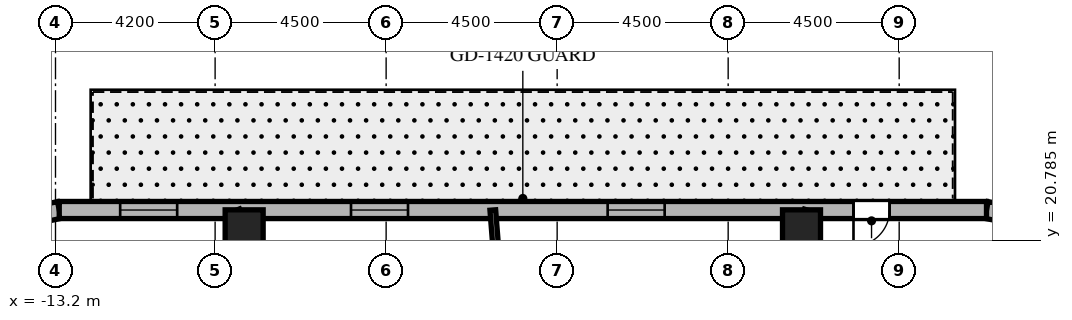
"""IFC4 building model, lengths in metres.
Left out: names, types, materials, properties, quantities, classifications, styles, units other than length and angle.
Written with IfcOpenShell. Run it as: python <this file> out.ifc"""

import sys

from ifc_helpers import new_model, si_unit, direction, frame, frame_2d, origin, origin_2d, place, context, subcontext, project, spatial, rectangle, extrude, element, fill, save


model = new_model("IFC4")
c1 = context("Model", 3, precision=1e-05, world=origin(), true_north=direction((0.0, 1.0)))
c2 = subcontext(c1, "Body", "Model", "MODEL_VIEW")
j1 = project(units=[si_unit("LENGTHUNIT", "METRE"), si_unit("PLANEANGLEUNIT", "RADIAN")], contexts=[c1])
p1 = place(None, origin())
s1 = spatial("IfcSite", under=j1, at=p1, CompositionType="ELEMENT")
p2 = place(p1, origin())
s2 = spatial("IfcBuilding", under=s1, at=p2, CompositionType="ELEMENT")
p3 = place(p2, frame((0.0, 0.0, 252.1)))
s3 = spatial("IfcBuildingStorey", under=s2, at=p3, CompositionType="ELEMENT", Elevation=252.1)
for number, where, z_axis, x_axis in (
    (1, (6.43, 21.08, 0.0), (0.0, 0.0, 1.0), (1.0, 0.0, 0.0)),
    (2, (-8.236, 21.08, 0.0), (0.0, 0.0, 1.0), (1.0, 0.0, 0.0)),
):
    element("IfcColumn", number, at=place(p3, frame(where, z_axis=z_axis, x_axis=x_axis)), inside=s3, PredefinedType="COLUMN", context=c2, shape_type="SweptSolid", body=[
        extrude(rectangle(XDim=1.0, YDim=1.0, at=origin_2d()), origin(), (0.0, 0.0, 1.0), 3.8),
    ])
p4 = place(p3, frame((12.546, 21.34, 0.0), z_axis=(0.0, 0.0, 1.0), x_axis=(-0.982686750835, 0.18527479519, 0.0)))
e3 = element("IfcWall", 3, at=p4, inside=s3, PredefinedType="SOLIDWALL", context=c2, shape_type="SweptSolid", body=[
    extrude(rectangle(XDim=1.27, YDim=0.45, at=frame_2d((0.635, 0.0))), origin(), (0.0, 0.0, 1.0), 3.48),
])
p5 = place(p3, frame((-13.102, 21.575, 0.0), z_axis=(0.0, 0.0, 1.0), x_axis=(-0.978757421505, -0.205021730188, 0.0)))
e4 = element("IfcWall", 4, at=p5, inside=s3, PredefinedType="SOLIDWALL", context=c2, shape_type="SweptSolid", body=[
    extrude(rectangle(XDim=1.406, YDim=0.45, at=frame_2d((0.703, 0.0))), origin(), (0.0, 0.0, 1.0), 3.48),
])
p6 = place(p3, frame((11.298, 21.575, 0.0), z_axis=(0.0, 0.0, 1.0), x_axis=(-1.0, 0.0, 0.0)))
e5 = element("IfcWall", 5, at=p6, inside=s3, PredefinedType="SOLIDWALL", context=c2, shape_type="SweptSolid", body=[
    extrude(rectangle(XDim=24.399, YDim=0.45, at=frame_2d((12.2, 0.0))), origin(), (0.0, 0.0, 1.0), 3.48),
])
p7 = place(p6, frame((2.55, 0.0, 0.0)))
e6 = element("IfcOpeningElement", 6, at=p7, cuts=e5, PredefinedType="OPENING", context=c2, shape_type="SweptSolid", body=[
    extrude(rectangle(XDim=0.95, YDim=2.15, at=frame_2d((0.475, 1.075))), frame((0.0, 0.235, 0.0), z_axis=(0.0, -1.0, 0.0), x_axis=(1.0, 0.0, 0.0)), (0.0, 0.0, 1.0), 0.47),
])
p8 = place(p6, frame((8.469, 0.0, 0.8)))
e7 = element("IfcOpeningElement", 7, at=p8, cuts=e5, PredefinedType="OPENING", context=c2, shape_type="SweptSolid", body=[
    extrude(rectangle(XDim=1.5, YDim=1.8, at=frame_2d((0.75, 0.9))), frame((0.0, 0.235, 0.0), z_axis=(0.0, -1.0, 0.0), x_axis=(1.0, 0.0, 0.0)), (0.0, 0.0, 1.0), 0.47),
])
p9 = place(p6, frame((15.222, 0.0, 0.8)))
e8 = element("IfcOpeningElement", 8, at=p9, cuts=e5, PredefinedType="OPENING", context=c2, shape_type="SweptSolid", body=[
    extrude(rectangle(XDim=1.5, YDim=1.8, at=frame_2d((0.75, 0.9))), frame((0.0, 0.235, 0.0), z_axis=(0.0, -1.0, 0.0), x_axis=(1.0, 0.0, 0.0)), (0.0, 0.0, 1.0), 0.47),
])
p10 = place(p6, frame((21.296, 0.0, 0.8)))
e9 = element("IfcOpeningElement", 9, at=p10, cuts=e5, PredefinedType="OPENING", context=c2, shape_type="SweptSolid", body=[
    extrude(rectangle(XDim=1.5, YDim=1.8, at=frame_2d((0.75, 0.9))), frame((0.0, 0.235, 0.0), z_axis=(0.0, -1.0, 0.0), x_axis=(1.0, 0.0, 0.0)), (0.0, 0.0, 1.0), 0.47),
])
p11 = place(p3, frame((3.004, 9.85, 0.0), z_axis=(0.0, 0.0, 1.0), x_axis=(0.291775760688, 0.956486751333, 0.0)))
e10 = element("IfcWall", 10, at=p11, inside=s3, PredefinedType="PARTITIONING", context=c2, shape_type="SweptSolid", body=[
    extrude(rectangle(XDim=12.258, YDim=0.15, at=frame_2d((6.129, 0.0))), origin(), (0.0, 0.0, 1.0), 2.72),
])
p12 = place(p3, frame((-1.1, 14.018, 0.0), z_axis=(0.0, 0.0, 1.0), x_axis=(-0.078228275349, 0.996935472804, 0.0)))
e11 = element("IfcWall", 11, at=p12, inside=s3, PredefinedType="PARTITIONING", context=c2, shape_type="SweptSolid", body=[
    extrude(rectangle(XDim=7.581, YDim=0.15, at=frame_2d((3.79, 0.0))), origin(), (0.0, 0.0, 1.0), 2.72),
])
p13 = place(p3, frame((-3.848, 9.85, 0.0), z_axis=(0.0, 0.0, 1.0), x_axis=(-0.363921778212, 0.931429513889, 0.0)))
e12 = element("IfcWall", 12, at=p13, inside=s3, PredefinedType="PARTITIONING", context=c2, shape_type="SweptSolid", body=[
    extrude(rectangle(XDim=12.588, YDim=0.15, at=frame_2d((6.294, 0.0))), origin(), (0.0, 0.0, 1.0), 2.72),
])
p14 = place(p7, origin())
e13 = element("IfcDoor", 13, at=p14, inside=s3, OperationType="SINGLE_SWING_RIGHT", PredefinedType="DOOR", context=c2, shape_type="SweptSolid", body=[
    extrude(rectangle(XDim=0.95, YDim=2.15, at=frame_2d((0.475, 1.075))), frame((0.0, 0.025, 0.0), z_axis=(0.0, -1.0, 0.0), x_axis=(1.0, 0.0, 0.0)), (0.0, 0.0, 1.0), 0.05),
])
fill(e6, e13)
p15 = place(p8, origin())
e14 = element("IfcWindow", 14, at=p15, inside=s3, PartitioningType="SINGLE_PANEL", PredefinedType="WINDOW", context=c2, shape_type="SweptSolid", body=[
    extrude(rectangle(XDim=1.5, YDim=1.8, at=frame_2d((0.75, 0.9))), frame((0.0, 0.03, 0.0), z_axis=(0.0, -1.0, 0.0), x_axis=(1.0, 0.0, 0.0)), (0.0, 0.0, 1.0), 0.06),
])
fill(e7, e14)
p16 = place(p9, origin())
e15 = element("IfcWindow", 15, at=p16, inside=s3, PartitioningType="SINGLE_PANEL", PredefinedType="WINDOW", context=c2, shape_type="SweptSolid", body=[
    extrude(rectangle(XDim=1.5, YDim=1.8, at=frame_2d((0.75, 0.9))), frame((0.0, 0.03, 0.0), z_axis=(0.0, -1.0, 0.0), x_axis=(1.0, 0.0, 0.0)), (0.0, 0.0, 1.0), 0.06),
])
fill(e8, e15)
p17 = place(p10, origin())
e16 = element("IfcWindow", 16, at=p17, inside=s3, PartitioningType="SINGLE_PANEL", PredefinedType="WINDOW", context=c2, shape_type="SweptSolid", body=[
    extrude(rectangle(XDim=1.5, YDim=1.8, at=frame_2d((0.75, 0.9))), frame((0.0, 0.03, 0.0), z_axis=(0.0, -1.0, 0.0), x_axis=(1.0, 0.0, 0.0)), (0.0, 0.0, 1.0), 0.06),
])
fill(e9, e16)
save(model, sys.argv[1])
